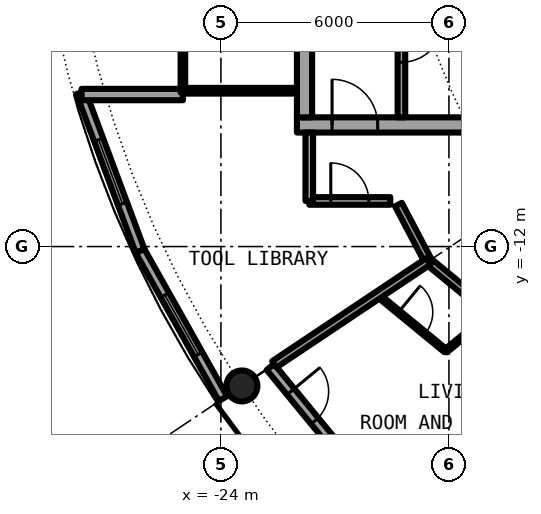
"""IFC4 building model, lengths in metres.
Left out: names, types, materials, properties, quantities, classifications, styles, units other than length and angle.
Written with IfcOpenShell. Run it as: python <this file> out.ifc"""

import sys

from ifc_helpers import new_model, si_unit, direction, frame, frame_2d, origin, origin_2d, place, context, subcontext, project, spatial, rectangle, hollow_circle, extrude, element, fill, save


model = new_model("IFC4")
c1 = context("Model", 3, precision=1e-05, world=origin(), true_north=direction((0.0, 1.0)))
c2 = subcontext(c1, "Body", "Model", "MODEL_VIEW")
j1 = project(units=[si_unit("LENGTHUNIT", "METRE"), si_unit("PLANEANGLEUNIT", "RADIAN")], contexts=[c1])
p1 = place(None, origin())
s1 = spatial("IfcSite", under=j1, at=p1, CompositionType="ELEMENT")
p2 = place(p1, origin())
s2 = spatial("IfcBuilding", under=s1, at=p2, CompositionType="ELEMENT")
p3 = place(p2, frame((0.0, 0.0, 227.95)))
s3 = spatial("IfcBuildingStorey", under=s2, at=p3, CompositionType="ELEMENT", Elevation=227.95)
p4 = place(p3, frame((-23.448, -15.667, 0.0), z_axis=(0.0, 0.0, 1.0), x_axis=(1.0, 0.0, 0.0)))
e1 = element("IfcColumn", 1, at=p4, inside=s3, PredefinedType="COLUMN", context=c2, shape_type="SweptSolid", body=[
    extrude(hollow_circle(Radius=0.406, WallThickness=0.03, at=origin_2d()), origin(), (0.0, 0.0, 1.0), 3.05),
])
p5 = place(p3, frame((-22.699, -15.167, 0.0), z_axis=(0.0, 0.0, 1.0), x_axis=(0.634382322723, -0.773019449054, 0.0)))
e2 = element("IfcWall", 2, at=p5, inside=s3, PredefinedType="SOLIDWALL", context=c2, shape_type="SweptSolid", body=[
    extrude(rectangle(XDim=5.352, YDim=0.25, at=frame_2d((2.676, 0.0))), origin(), (0.0, 0.0, 1.0), 2.7),
])
p6 = place(p5, frame((0.841, 0.0, 0.0)))
e3 = element("IfcOpeningElement", 3, at=p6, cuts=e2, PredefinedType="OPENING", context=c2, shape_type="SweptSolid", body=[
    extrude(rectangle(XDim=1.0, YDim=2.2, at=frame_2d((0.5, 1.1))), frame((0.0, 0.135, 0.0), z_axis=(0.0, -1.0, 0.0), x_axis=(1.0, 0.0, 0.0)), (0.0, 0.0, 1.0), 0.27),
])
p7 = place(p5, frame((3.111, 0.0, 0.3)))
e4 = element("IfcOpeningElement", 4, at=p7, cuts=e2, PredefinedType="OPENING", context=c2, shape_type="SweptSolid", body=[
    extrude(rectangle(XDim=1.8, YDim=2.1, at=frame_2d((0.9, 1.05))), frame((0.0, 0.135, 0.0), z_axis=(0.0, -1.0, 0.0), x_axis=(1.0, 0.0, 0.0)), (0.0, 0.0, 1.0), 0.27),
])
p8 = place(p3, frame((-27.682, -7.945, 0.0), z_axis=(0.0, 0.0, 1.0), x_axis=(0.349247811493, -0.937030397675, 0.0)))
e5 = element("IfcWall", 5, at=p8, inside=s3, PredefinedType="SOLIDWALL", context=c2, shape_type="SweptSolid", body=[
    extrude(rectangle(XDim=4.452, YDim=0.25, at=frame_2d((2.226, 0.0))), origin(), (0.0, 0.0, 1.0), 2.7),
])
p9 = place(p8, frame((1.327, 0.0, 0.3)))
e6 = element("IfcOpeningElement", 6, at=p9, cuts=e5, PredefinedType="OPENING", context=c2, shape_type="SweptSolid", body=[
    extrude(rectangle(XDim=1.8, YDim=2.1, at=frame_2d((0.9, 1.05))), frame((0.0, 0.135, 0.0), z_axis=(0.0, -1.0, 0.0), x_axis=(1.0, 0.0, 0.0)), (0.0, 0.0, 1.0), 0.27),
])
p10 = place(p3, frame((-26.127, -12.117, 0.0), z_axis=(0.0, 0.0, 1.0), x_axis=(0.489696356642, -0.871893042919, 0.0)))
e7 = element("IfcWall", 7, at=p10, inside=s3, PredefinedType="SOLIDWALL", context=c2, shape_type="SweptSolid", body=[
    extrude(rectangle(XDim=4.454, YDim=0.25, at=frame_2d((2.227, 0.0))), origin(), (0.0, 0.0, 1.0), 2.7),
])
p11 = place(p10, frame((1.327, 0.0, 0.3)))
e8 = element("IfcOpeningElement", 8, at=p11, cuts=e7, PredefinedType="OPENING", context=c2, shape_type="SweptSolid", body=[
    extrude(rectangle(XDim=1.8, YDim=2.1, at=frame_2d((0.9, 1.05))), frame((0.0, 0.135, 0.0), z_axis=(0.0, -1.0, 0.0), x_axis=(1.0, 0.0, 0.0)), (0.0, 0.0, 1.0), 0.27),
])
p12 = place(p3, frame((-25.0, -8.0, 0.0), z_axis=(0.0, 0.0, 1.0), x_axis=(-1.0, 0.0, 0.0)))
e9 = element("IfcWall", 9, at=p12, inside=s3, PredefinedType="SOLIDWALL", context=c2, shape_type="SweptSolid", body=[
    extrude(rectangle(XDim=2.667, YDim=0.3, at=frame_2d((1.333, 0.0))), origin(), (0.0, 0.0, 1.0), 2.7),
])
p13 = place(p3, frame((-22.0, -8.8, 0.0), z_axis=(0.0, 0.0, 1.0), x_axis=(1.0, 0.0, 0.0)))
e10 = element("IfcWall", 10, at=p13, inside=s3, PredefinedType="SHEAR", context=c2, shape_type="SweptSolid", body=[
    extrude(rectangle(XDim=13.4, YDim=0.4, at=frame_2d((6.7, 0.0))), origin(), (0.0, 0.0, 1.0), 3.05),
])
p14 = place(p13, frame((0.925, 0.0, 0.0)))
e11 = element("IfcOpeningElement", 11, at=p14, cuts=e10, PredefinedType="OPENING", context=c2, shape_type="SweptSolid", body=[
    extrude(rectangle(XDim=1.2, YDim=2.3, at=frame_2d((0.6, 1.15))), frame((0.0, 0.21, 0.0), z_axis=(0.0, -1.0, 0.0), x_axis=(1.0, 0.0, 0.0)), (0.0, 0.0, 1.0), 0.42),
])
p15 = place(p3, frame((-21.8, -8.6, 0.0), z_axis=(0.0, 0.0, 1.0), x_axis=(0.0, 1.0, 0.0)))
e12 = element("IfcWall", 12, at=p15, inside=s3, PredefinedType="SHEAR", context=c2, shape_type="SweptSolid", body=[
    extrude(rectangle(XDim=17.2, YDim=0.4, at=frame_2d((8.6, 0.0))), origin(), (0.0, 0.0, 1.0), 3.05),
])
p16 = place(p15, frame((7.7, 0.0, 0.0)))
e13 = element("IfcOpeningElement", 13, at=p16, cuts=e12, PredefinedType="OPENING", context=c2, shape_type="SweptSolid", body=[
    extrude(rectangle(XDim=1.8, YDim=2.3, at=frame_2d((0.9, 1.15))), frame((0.0, 0.21, 0.0), z_axis=(0.0, -1.0, 0.0), x_axis=(1.0, 0.0, 0.0)), (0.0, 0.0, 1.0), 0.42),
])
p17 = place(p3, frame((-19.25, -1.575, 0.0), z_axis=(0.0, 0.0, 1.0), x_axis=(0.0, -1.0, 0.0)))
e14 = element("IfcWall", 14, at=p17, inside=s3, PredefinedType="SOLIDWALL", context=c2, shape_type="SweptSolid", body=[
    extrude(rectangle(XDim=7.025, YDim=0.2, at=frame_2d((3.513, 0.0))), origin(), (0.0, 0.0, 1.0), 2.7),
])
p18 = place(p17, frame((4.475, 0.0, 0.0)))
e15 = element("IfcOpeningElement", 15, at=p18, cuts=e14, PredefinedType="OPENING", context=c2, shape_type="SweptSolid", body=[
    extrude(rectangle(XDim=1.1, YDim=2.3, at=frame_2d((0.55, 1.15))), frame((0.0, 0.11, 0.0), z_axis=(0.0, -1.0, 0.0), x_axis=(1.0, 0.0, 0.0)), (0.0, 0.0, 1.0), 0.22),
])
p19 = place(p3, frame((-22.0, -7.9, 0.0), z_axis=(0.0, 0.0, 1.0), x_axis=(-1.0, 0.0, 0.0)))
e16 = element("IfcWall", 16, at=p19, inside=s3, PredefinedType="PARTITIONING", context=c2, shape_type="SweptSolid", body=[
    extrude(rectangle(XDim=2.94, YDim=0.15, at=frame_2d((1.47, 0.0))), origin(), (0.0, 0.0, 1.0), 2.7),
])
p20 = place(p3, frame((-25.0, -7.95, 0.0), z_axis=(0.0, 0.0, 1.0), x_axis=(0.0, 1.0, 0.0)))
e17 = element("IfcWall", 17, at=p20, inside=s3, PredefinedType="PARTITIONING", context=c2, shape_type="SweptSolid", body=[
    extrude(rectangle(XDim=15.9, YDim=0.12, at=frame_2d((7.95, 0.0))), origin(), (0.0, 0.0, 1.0), 2.7),
])
p21 = place(p20, frame((6.75, 0.0, 0.0)))
e18 = element("IfcOpeningElement", 18, at=p21, cuts=e17, PredefinedType="OPENING", context=c2, shape_type="SweptSolid", body=[
    extrude(rectangle(XDim=2.4, YDim=2.3, at=frame_2d((1.2, 1.15))), frame((0.0, 0.07, 0.0), z_axis=(0.0, -1.0, 0.0), x_axis=(1.0, 0.0, 0.0)), (0.0, 0.0, 1.0), 0.14),
])
p22 = place(p20, frame((11.55, 0.0, 0.1)))
e19 = element("IfcOpeningElement", 19, at=p22, cuts=e17, PredefinedType="OPENING", context=c2, shape_type="SweptSolid", body=[
    extrude(rectangle(XDim=3.4, YDim=2.35, at=frame_2d((1.7, 1.175))), frame((0.0, 0.07, 0.0), z_axis=(0.0, -1.0, 0.0), x_axis=(1.0, 0.0, 0.0)), (0.0, 0.0, 1.0), 0.14),
])
p23 = place(p20, frame((0.95, 0.0, 0.1)))
e20 = element("IfcOpeningElement", 20, at=p23, cuts=e17, PredefinedType="OPENING", context=c2, shape_type="SweptSolid", body=[
    extrude(rectangle(XDim=3.4, YDim=2.35, at=frame_2d((1.7, 1.175))), frame((0.0, 0.07, 0.0), z_axis=(0.0, -1.0, 0.0), x_axis=(1.0, 0.0, 0.0)), (0.0, 0.0, 1.0), 0.14),
])
p24 = place(p3, frame((-19.875, -13.274, 0.0), z_axis=(0.0, 0.0, 1.0), x_axis=(0.77288890179, -0.634541366256, 0.0)))
e21 = element("IfcWall", 21, at=p24, inside=s3, PredefinedType="PARTITIONING", context=c2, shape_type="SweptSolid", body=[
    extrude(rectangle(XDim=2.313, YDim=0.1, at=frame_2d((1.157, 0.0))), origin(), (0.0, 0.0, 1.0), 2.7),
])
p25 = place(p24, frame((0.711, 0.0, 0.0)))
e22 = element("IfcOpeningElement", 22, at=p25, cuts=e21, PredefinedType="OPENING", context=c2, shape_type="SweptSolid", body=[
    extrude(rectangle(XDim=0.9, YDim=2.3, at=frame_2d((0.45, 1.15))), frame((0.0, 0.06, 0.0), z_axis=(0.0, -1.0, 0.0), x_axis=(1.0, 0.0, 0.0)), (0.0, 0.0, 1.0), 0.12),
])
p26 = place(p3, frame((-19.328, -10.896, 0.0), z_axis=(0.0, 0.0, 1.0), x_axis=(0.465812036273, -0.88488369115, 0.0)))
e23 = element("IfcWall", 23, at=p26, inside=s3, PredefinedType="PARTITIONING", context=c2, shape_type="SweptSolid", body=[
    extrude(rectangle(XDim=1.687, YDim=0.2, at=frame_2d((0.844, 0.0))), origin(), (0.0, 0.0, 1.0), 2.7),
])
p27 = place(p3, frame((-18.542, -12.389, 0.0), z_axis=(0.0, 0.0, 1.0), x_axis=(0.772983503654, -0.634426121056, 0.0)))
e24 = element("IfcWall", 24, at=p27, inside=s3, PredefinedType="PARTITIONING", context=c2, shape_type="SweptSolid", body=[
    extrude(rectangle(XDim=12.947, YDim=0.2, at=frame_2d((6.474, 0.0))), origin(), (0.0, 0.0, 1.0), 2.7),
])
p28 = place(p27, frame((7.053, 0.0, 0.0)))
e25 = element("IfcOpeningElement", 25, at=p28, cuts=e24, PredefinedType="OPENING", context=c2, shape_type="SweptSolid", body=[
    extrude(rectangle(XDim=1.0, YDim=2.3, at=frame_2d((0.5, 1.15))), frame((0.0, 0.11, 0.0), z_axis=(0.0, -1.0, 0.0), x_axis=(1.0, 0.0, 0.0)), (0.0, 0.0, 1.0), 0.22),
])
p29 = place(p3, frame((-21.675, -10.8, 0.0), z_axis=(0.0, 0.0, 1.0), x_axis=(1.0, 0.0, 0.0)))
e26 = element("IfcWall", 26, at=p29, inside=s3, PredefinedType="PARTITIONING", context=c2, shape_type="SweptSolid", body=[
    extrude(rectangle(XDim=2.132, YDim=0.2, at=frame_2d((1.066, 0.0))), origin(), (0.0, 0.0, 1.0), 2.7),
])
p30 = place(p29, frame((0.566, 0.0, 0.0)))
e27 = element("IfcOpeningElement", 27, at=p30, cuts=e26, PredefinedType="OPENING", context=c2, shape_type="SweptSolid", body=[
    extrude(rectangle(XDim=1.0, YDim=2.3, at=frame_2d((0.5, 1.15))), frame((0.0, 0.11, 0.0), z_axis=(0.0, -1.0, 0.0), x_axis=(1.0, 0.0, 0.0)), (0.0, 0.0, 1.0), 0.22),
])
p31 = place(p3, frame((-22.595, -15.098, 0.0), z_axis=(0.0, 0.0, 1.0), x_axis=(0.831387096605, 0.55569370664, 0.0)))
e28 = element("IfcWall", 28, at=p31, inside=s3, PredefinedType="PARTITIONING", context=c2, shape_type="SweptSolid", body=[
    extrude(rectangle(XDim=4.875, YDim=0.2, at=frame_2d((2.438, 0.0))), origin(), (0.0, 0.0, 1.0), 2.7),
])
p32 = place(p3, frame((-18.084, -14.745, 0.0), z_axis=(0.0, 0.0, 1.0), x_axis=(0.774869051393, 0.632121786679, 0.0)))
e29 = element("IfcWall", 29, at=p32, inside=s3, PredefinedType="PARTITIONING", context=c2, shape_type="SweptSolid", body=[
    extrude(rectangle(XDim=1.562, YDim=0.1, at=frame_2d((0.781, 0.0))), origin(), (0.0, 0.0, 1.0), 2.7),
])
p33 = place(p3, frame((-21.675, -10.8, 0.0), z_axis=(0.0, 0.0, 1.0), x_axis=(0.0, 1.0, 0.0)))
e30 = element("IfcWall", 30, at=p33, inside=s3, PredefinedType="PARTITIONING", context=c2, shape_type="SweptSolid", body=[
    extrude(rectangle(XDim=1.8, YDim=0.2, at=frame_2d((0.9, 0.0))), origin(), (0.0, 0.0, 1.0), 2.7),
])
p34 = place(p6, origin())
e31 = element("IfcDoor", 31, at=p34, inside=s3, OperationType="SINGLE_SWING_LEFT", PredefinedType="DOOR", context=c2, shape_type="SweptSolid", body=[
    extrude(rectangle(XDim=1.0, YDim=2.2, at=frame_2d((0.5, 1.1))), frame((0.0, 0.025, 0.0), z_axis=(0.0, -1.0, 0.0), x_axis=(1.0, 0.0, 0.0)), (0.0, 0.0, 1.0), 0.05),
])
fill(e3, e31)
p35 = place(p9, origin())
e32 = element("IfcWindow", 32, at=p35, inside=s3, PartitioningType="SINGLE_PANEL", PredefinedType="WINDOW", context=c2, shape_type="SweptSolid", body=[
    extrude(rectangle(XDim=1.8, YDim=2.1, at=frame_2d((0.9, 1.05))), frame((0.0, 0.03, 0.0), z_axis=(0.0, -1.0, 0.0), x_axis=(1.0, 0.0, 0.0)), (0.0, 0.0, 1.0), 0.06),
])
fill(e6, e32)
p36 = place(p11, origin())
e33 = element("IfcWindow", 33, at=p36, inside=s3, PartitioningType="SINGLE_PANEL", PredefinedType="WINDOW", context=c2, shape_type="SweptSolid", body=[
    extrude(rectangle(XDim=1.8, YDim=2.1, at=frame_2d((0.9, 1.05))), frame((0.0, 0.03, 0.0), z_axis=(0.0, -1.0, 0.0), x_axis=(1.0, 0.0, 0.0)), (0.0, 0.0, 1.0), 0.06),
])
fill(e8, e33)
p37 = place(p18, origin())
e34 = element("IfcDoor", 34, at=p37, inside=s3, OperationType="SINGLE_SWING_LEFT", PredefinedType="DOOR", context=c2, shape_type="SweptSolid", body=[
    extrude(rectangle(XDim=1.1, YDim=2.3, at=frame_2d((0.55, 1.15))), frame((0.0, 0.025, 0.0), z_axis=(0.0, -1.0, 0.0), x_axis=(1.0, 0.0, 0.0)), (0.0, 0.0, 1.0), 0.05),
])
fill(e15, e34)
p38 = place(p14, origin())
e35 = element("IfcDoor", 35, at=p38, inside=s3, OperationType="SINGLE_SWING_RIGHT", PredefinedType="DOOR", context=c2, shape_type="SweptSolid", body=[
    extrude(rectangle(XDim=1.2, YDim=2.3, at=frame_2d((0.6, 1.15))), frame((0.0, 0.025, 0.0), z_axis=(0.0, -1.0, 0.0), x_axis=(1.0, 0.0, 0.0)), (0.0, 0.0, 1.0), 0.05),
])
fill(e11, e35)
p39 = place(p23, origin())
e36 = element("IfcWindow", 36, at=p39, inside=s3, PartitioningType="SINGLE_PANEL", PredefinedType="WINDOW", context=c2, shape_type="SweptSolid", body=[
    extrude(rectangle(XDim=3.4, YDim=2.35, at=frame_2d((1.7, 1.175))), frame((0.0, 0.03, 0.0), z_axis=(0.0, -1.0, 0.0), x_axis=(1.0, 0.0, 0.0)), (0.0, 0.0, 1.0), 0.06),
])
fill(e20, e36)
p40 = place(p25, origin())
e37 = element("IfcDoor", 37, at=p40, inside=s3, OperationType="SINGLE_SWING_RIGHT", PredefinedType="DOOR", context=c2, shape_type="SweptSolid", body=[
    extrude(rectangle(XDim=0.9, YDim=2.3, at=frame_2d((0.45, 1.15))), frame((0.0, 0.025, 0.0), z_axis=(0.0, -1.0, 0.0), x_axis=(1.0, 0.0, 0.0)), (0.0, 0.0, 1.0), 0.05),
])
fill(e22, e37)
p41 = place(p30, origin())
e38 = element("IfcDoor", 38, at=p41, inside=s3, OperationType="SINGLE_SWING_LEFT", PredefinedType="DOOR", context=c2, shape_type="SweptSolid", body=[
    extrude(rectangle(XDim=1.0, YDim=2.3, at=frame_2d((0.5, 1.15))), frame((0.0, 0.025, 0.0), z_axis=(0.0, -1.0, 0.0), x_axis=(1.0, 0.0, 0.0)), (0.0, 0.0, 1.0), 0.05),
])
fill(e27, e38)
save(model, sys.argv[1])
